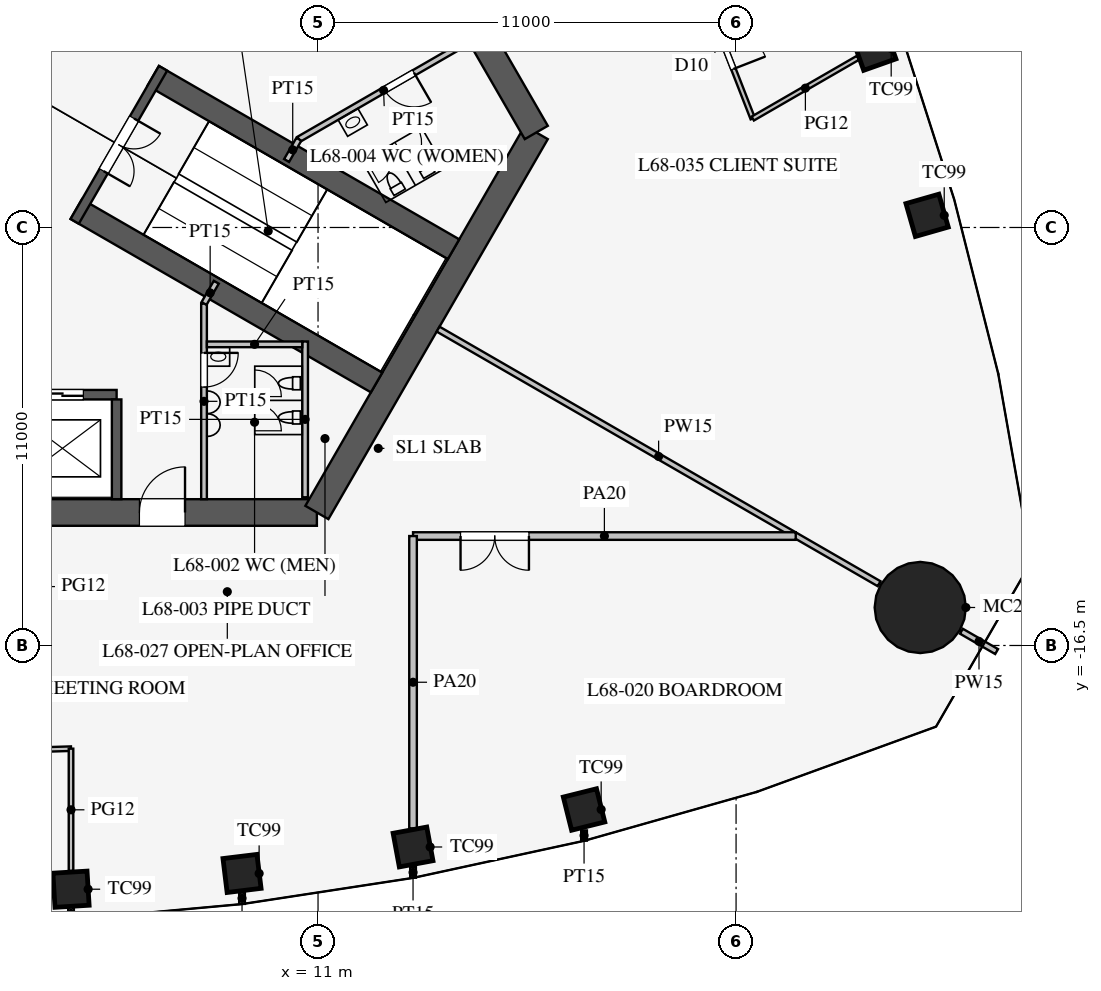
"""IFC4 building model, lengths in metres.
Left out: names, types, materials, properties, quantities, classifications, styles, units other than length and angle.
Written with IfcOpenShell. Run it as: python <this file> out.ifc"""

import sys

from ifc_helpers import new_model, si_unit, direction, frame, frame_2d, origin, origin_2d, place, context, subcontext, project, spatial, rectangle, circle, extrude, element, fill, save


model = new_model("IFC4")
c1 = context("Model", 3, precision=1e-05, world=origin(), true_north=direction((0.0, 1.0)))
c2 = subcontext(c1, "Body", "Model", "MODEL_VIEW")
j1 = project(units=[si_unit("LENGTHUNIT", "METRE"), si_unit("PLANEANGLEUNIT", "RADIAN")], contexts=[c1])
p1 = place(None, origin())
s1 = spatial("IfcSite", under=j1, at=p1, CompositionType="ELEMENT")
p2 = place(p1, origin())
s2 = spatial("IfcBuilding", under=s1, at=p2, CompositionType="ELEMENT")
p3 = place(p2, frame((0.0, 0.0, 297.3)))
s3 = spatial("IfcBuildingStorey", under=s2, at=p3, CompositionType="ELEMENT", Elevation=297.3)
for number, where, z_axis, x_axis in (
    (1, (4.5, -22.914, 0.0), (0.0, 0.0, 1.0), (0.998, 0.061, 0.0)),
    (2, (9.0, -22.499, 0.0), (0.0, 0.0, 1.0), (0.993, 0.121, 0.0)),
    (3, (13.5, -21.803, 0.0), (0.0, 0.0, 1.0), (0.983, 0.182, 0.0)),
    (4, (18.0, -20.816, 0.0), (0.0, 0.0, 1.0), (0.97, 0.242, 0.0)),
    (5, (27.027, -5.18, 0.0), (0.0, 0.0, 1.0), (-0.275, 0.961, 0.0)),
    (6, (25.632, -0.79, 0.0), (0.0, 0.0, 1.0), (-0.334, 0.942, 0.0)),
):
    element("IfcColumn", number, at=place(p3, frame(where, z_axis=z_axis, x_axis=x_axis)), inside=s3, PredefinedType="COLUMN", context=c2, shape_type="SweptSolid", body=[
        extrude(rectangle(XDim=0.9, YDim=0.9, at=origin_2d()), origin(), (0.0, 0.0, 1.0), 4.2),
    ])
p4 = place(p3, frame((26.847, -15.5, 0.0), z_axis=(0.0, 0.0, 1.0), x_axis=(1.0, 0.0, 0.0)))
e7 = element("IfcColumn", 7, at=p4, inside=s3, PredefinedType="COLUMN", context=c2, shape_type="SweptSolid", body=[
    extrude(circle(Radius=1.2, at=origin_2d()), origin(), (0.0, 0.0, 1.0), 4.2),
])
p5 = place(p3, frame((-10.97, -13.0, 0.0), z_axis=(0.0, 0.0, 1.0), x_axis=(1.0, 0.0, 0.0)))
e8 = element("IfcWall", 8, at=p5, inside=s3, PredefinedType="SHEAR", context=c2, shape_type="SweptSolid", body=[
    extrude(rectangle(XDim=21.939, YDim=0.7, at=frame_2d((10.97, 0.0))), origin(), (0.0, 0.0, 1.0), 4.2),
])
p6 = place(p5, frame((17.27, 0.0, 0.0)))
e9 = element("IfcOpeningElement", 9, at=p6, cuts=e8, PredefinedType="OPENING", context=c2, shape_type="SweptSolid", body=[
    extrude(rectangle(XDim=1.2, YDim=2.1, at=frame_2d((0.6, 1.05))), frame((0.0, 0.36, 0.0), z_axis=(0.0, -1.0, 0.0), x_axis=(1.0, 0.0, 0.0)), (0.0, 0.0, 1.0), 0.72),
])
p7 = place(p5, frame((3.47, 0.0, 0.0)))
e10 = element("IfcOpeningElement", 10, at=p7, cuts=e8, PredefinedType="OPENING", context=c2, shape_type="SweptSolid", body=[
    extrude(rectangle(XDim=1.2, YDim=2.1, at=frame_2d((0.6, 1.05))), frame((0.0, 0.36, 0.0), z_axis=(0.0, -1.0, 0.0), x_axis=(1.0, 0.0, 0.0)), (0.0, 0.0, 1.0), 0.72),
])
p8 = place(p3, frame((10.97, -13.0, 0.0), z_axis=(0.0, 0.0, 1.0), x_axis=(0.499995765644, 0.866027848477, 0.0)))
e11 = element("IfcWall", 11, at=p8, inside=s3, PredefinedType="SHEAR", context=c2, shape_type="SweptSolid", body=[
    extrude(rectangle(XDim=11.547, YDim=0.7, at=frame_2d((5.773, 0.0))), origin(), (0.0, 0.0, 1.0), 4.2),
])
p9 = place(p3, frame((16.743, -3.0, 0.0), z_axis=(0.0, 0.0, 1.0), x_axis=(-0.500002442456, 0.866023993627, 0.0)))
e12 = element("IfcWall", 12, at=p9, inside=s3, PredefinedType="SHEAR", context=c2, shape_type="SweptSolid", body=[
    extrude(rectangle(XDim=21.939, YDim=0.7, at=frame_2d((10.97, 0.0))), origin(), (0.0, 0.0, 1.0), 4.2),
])
p10 = place(p9, frame((17.27, 0.0, 0.0)))
e13 = element("IfcOpeningElement", 13, at=p10, cuts=e12, PredefinedType="OPENING", context=c2, shape_type="SweptSolid", body=[
    extrude(rectangle(XDim=1.2, YDim=2.1, at=frame_2d((0.6, 1.05))), frame((0.0, 0.36, 0.0), z_axis=(0.0, -1.0, 0.0), x_axis=(1.0, 0.0, 0.0)), (0.0, 0.0, 1.0), 0.72),
])
p11 = place(p9, frame((3.47, 0.0, 0.0)))
e14 = element("IfcOpeningElement", 14, at=p11, cuts=e12, PredefinedType="OPENING", context=c2, shape_type="SweptSolid", body=[
    extrude(rectangle(XDim=1.2, YDim=2.1, at=frame_2d((0.6, 1.05))), frame((0.0, 0.36, 0.0), z_axis=(0.0, -1.0, 0.0), x_axis=(1.0, 0.0, 0.0)), (0.0, 0.0, 1.0), 0.72),
])
p12 = place(p3, frame((-5.7, -9.9, 0.0), z_axis=(0.0, 0.0, 1.0), x_axis=(1.0, 0.0, 0.0)))
e15 = element("IfcWall", 15, at=p12, inside=s3, PredefinedType="SHEAR", context=c2, shape_type="SweptSolid", body=[
    extrude(rectangle(XDim=11.4, YDim=0.25, at=frame_2d((5.7, 0.0))), origin(), (0.0, 0.0, 1.0), 4.2),
])
p13 = place(p12, frame((0.875, 0.0, 0.0)))
e16 = element("IfcOpeningElement", 16, at=p13, cuts=e15, PredefinedType="OPENING", context=c2, shape_type="SweptSolid", body=[
    extrude(rectangle(XDim=1.1, YDim=2.2, at=frame_2d((0.55, 1.1))), frame((0.0, 0.135, 0.0), z_axis=(0.0, -1.0, 0.0), x_axis=(1.0, 0.0, 0.0)), (0.0, 0.0, 1.0), 0.27),
])
p14 = place(p12, frame((3.725, 0.0, 0.0)))
e17 = element("IfcOpeningElement", 17, at=p14, cuts=e15, PredefinedType="OPENING", context=c2, shape_type="SweptSolid", body=[
    extrude(rectangle(XDim=1.1, YDim=2.2, at=frame_2d((0.55, 1.1))), frame((0.0, 0.135, 0.0), z_axis=(0.0, -1.0, 0.0), x_axis=(1.0, 0.0, 0.0)), (0.0, 0.0, 1.0), 0.27),
])
p15 = place(p12, frame((6.575, 0.0, 0.0)))
e18 = element("IfcOpeningElement", 18, at=p15, cuts=e15, PredefinedType="OPENING", context=c2, shape_type="SweptSolid", body=[
    extrude(rectangle(XDim=1.1, YDim=2.2, at=frame_2d((0.55, 1.1))), frame((0.0, 0.135, 0.0), z_axis=(0.0, -1.0, 0.0), x_axis=(1.0, 0.0, 0.0)), (0.0, 0.0, 1.0), 0.27),
])
p16 = place(p12, frame((9.425, 0.0, 0.0)))
e19 = element("IfcOpeningElement", 19, at=p16, cuts=e15, PredefinedType="OPENING", context=c2, shape_type="SweptSolid", body=[
    extrude(rectangle(XDim=1.1, YDim=2.2, at=frame_2d((0.55, 1.1))), frame((0.0, 0.135, 0.0), z_axis=(0.0, -1.0, 0.0), x_axis=(1.0, 0.0, 0.0)), (0.0, 0.0, 1.0), 0.27),
])
p17 = place(p3, frame((5.7, -10.025, 0.0), z_axis=(0.0, 0.0, 1.0), x_axis=(0.0, -1.0, 0.0)))
e20 = element("IfcWall", 20, at=p17, inside=s3, PredefinedType="SHEAR", context=c2, shape_type="SweptSolid", body=[
    extrude(rectangle(XDim=2.625, YDim=0.25, at=frame_2d((1.312, 0.0))), origin(), (0.0, 0.0, 1.0), 4.2),
])
for number, where, z_axis, x_axis in (
    (21, (4.638, -5.016, 0.0), (0.0, 0.0, 1.0), (0.866, -0.5, 0.0)),
    (22, (6.663, -1.509, 0.0), (0.0, 0.0, 1.0), (0.866, -0.5, 0.0)),
):
    element("IfcWall", number, at=place(p3, frame(where, z_axis=z_axis, x_axis=x_axis)), inside=s3, PredefinedType="SHEAR", context=c2, shape_type="SweptSolid", body=[
        extrude(rectangle(XDim=9.125, YDim=0.6, at=frame_2d((4.562, 0.0))), origin(), (0.0, 0.0, 1.0), 4.2),
    ])
p18 = place(p3, frame((4.597, -5.339, 0.0), z_axis=(0.0, 0.0, 1.0), x_axis=(0.499984536904, 0.866034331223, 0.0)))
e23 = element("IfcWall", 23, at=p18, inside=s3, PredefinedType="SHEAR", context=c2, shape_type="SweptSolid", body=[
    extrude(rectangle(XDim=4.65, YDim=0.25, at=frame_2d((2.325, 0.0))), origin(), (0.0, 0.0, 1.0), 4.2),
])
p19 = place(p18, frame((1.525, 0.0, 0.0)))
e24 = element("IfcOpeningElement", 24, at=p19, cuts=e23, PredefinedType="OPENING", context=c2, shape_type="SweptSolid", body=[
    extrude(rectangle(XDim=1.6, YDim=2.1, at=frame_2d((0.8, 1.05))), frame((0.0, 0.135, 0.0), z_axis=(0.0, -1.0, 0.0), x_axis=(1.0, 0.0, 0.0)), (0.0, 0.0, 1.0), 0.27),
])
p20 = place(p3, frame((8.0, -7.5, 0.0), z_axis=(0.0, 0.0, 1.0), x_axis=(0.0, -1.0, 0.0)))
e25 = element("IfcWall", 25, at=p20, inside=s3, PredefinedType="PARTITIONING", context=c2, shape_type="SweptSolid", body=[
    extrude(rectangle(XDim=5.15, YDim=0.15, at=frame_2d((2.575, 0.0))), origin(), (0.0, 0.0, 1.0), 4.0),
])
p21 = place(p20, frame((1.3, 0.0, 0.0)))
e26 = element("IfcOpeningElement", 26, at=p21, cuts=e25, PredefinedType="OPENING", context=c2, shape_type="SweptSolid", body=[
    extrude(rectangle(XDim=0.9, YDim=2.1, at=frame_2d((0.45, 1.05))), frame((0.0, 0.085, 0.0), z_axis=(0.0, -1.0, 0.0), x_axis=(1.0, 0.0, 0.0)), (0.0, 0.0, 1.0), 0.17),
])
p22 = place(p3, frame((10.495, -3.178, 0.0), z_axis=(0.0, 0.0, 1.0), x_axis=(0.866037967349, 0.499978238636, 0.0)))
e27 = element("IfcWall", 27, at=p22, inside=s3, PredefinedType="PARTITIONING", context=c2, shape_type="SweptSolid", body=[
    extrude(rectangle(XDim=5.15, YDim=0.15, at=frame_2d((2.575, 0.0))), origin(), (0.0, 0.0, 1.0), 4.0),
])
p23 = place(p22, frame((2.6, 0.0, 0.0)))
e28 = element("IfcOpeningElement", 28, at=p23, cuts=e27, PredefinedType="OPENING", context=c2, shape_type="SweptSolid", body=[
    extrude(rectangle(XDim=0.9, YDim=2.1, at=frame_2d((0.45, 1.05))), frame((0.0, 0.085, 0.0), z_axis=(0.0, -1.0, 0.0), x_axis=(1.0, 0.0, 0.0)), (0.0, 0.0, 1.0), 0.17),
])
for number, where, z_axis, x_axis in (
    (29, (8.0, -7.5, 0.0), (0.0, 0.0, 1.0), (0.5, 0.866, 0.0)),
    (30, (10.495, -3.178, 0.0), (0.0, 0.0, 1.0), (-0.5, -0.866, 0.0)),
):
    element("IfcWall", number, at=place(p3, frame(where, z_axis=z_axis, x_axis=x_axis)), inside=s3, PredefinedType="PARTITIONING", context=c2, shape_type="SweptSolid", body=[
        extrude(rectangle(XDim=0.645, YDim=0.15, at=frame_2d((0.323, 0.0))), origin(), (0.0, 0.0, 1.0), 4.0),
    ])
p24 = place(p3, frame((10.66, -8.5, 0.0), z_axis=(0.0, 0.0, 1.0), x_axis=(0.0, -1.0, 0.0)))
e31 = element("IfcWall", 31, at=p24, inside=s3, PredefinedType="PARTITIONING", context=c2, shape_type="SweptSolid", body=[
    extrude(rectangle(XDim=4.1, YDim=0.15, at=frame_2d((2.05, 0.0))), origin(), (0.0, 0.0, 1.0), 4.0),
])
p25 = place(p3, frame((8.075, -8.575, 0.0), z_axis=(0.0, 0.0, 1.0), x_axis=(1.0, 0.0, 0.0)))
e32 = element("IfcWall", 32, at=p25, inside=s3, PredefinedType="PARTITIONING", context=c2, shape_type="SweptSolid", body=[
    extrude(rectangle(XDim=2.51, YDim=0.15, at=frame_2d((1.255, 0.0))), origin(), (0.0, 0.0, 1.0), 4.0),
])
p26 = place(p3, frame((14.159, -8.175, 0.0), z_axis=(0.0, 0.0, 1.0), x_axis=(0.866026905467, -0.499997399001, 0.0)))
e33 = element("IfcWall", 33, at=p26, inside=s3, PredefinedType="PARTITIONING", context=c2, shape_type="SweptSolid", body=[
    extrude(rectangle(XDim=13.4, YDim=0.15, at=frame_2d((6.7, 0.0))), origin(), (0.0, 0.0, 1.0), 2.5),
])
p27 = place(p3, frame((27.929, -16.125, 0.0), z_axis=(0.0, 0.0, 1.0), x_axis=(0.866086810508, -0.499893625349, 0.0)))
e34 = element("IfcWall", 34, at=p27, inside=s3, PredefinedType="PARTITIONING", context=c2, shape_type="SweptSolid", body=[
    extrude(rectangle(XDim=1.07, YDim=0.15, at=frame_2d((0.535, 0.0))), origin(), (0.0, 0.0, 1.0), 2.5),
])
p28 = place(p3, frame((13.5, -13.62, 0.0), z_axis=(0.0, 0.0, 1.0), x_axis=(1.0, 0.0, 0.0)))
e35 = element("IfcWall", 35, at=p28, inside=s3, PredefinedType="PARTITIONING", context=c2, shape_type="SweptSolid", body=[
    extrude(rectangle(XDim=10.07, YDim=0.2, at=frame_2d((5.035, 0.0))), origin(), (0.0, 0.0, 1.0), 2.9),
])
p29 = place(p28, frame((1.25, 0.0, 0.15)))
e36 = element("IfcOpeningElement", 36, at=p29, cuts=e35, PredefinedType="OPENING", context=c2, shape_type="SweptSolid", body=[
    extrude(rectangle(XDim=1.8, YDim=2.1, at=frame_2d((0.9, 1.05))), frame((0.0, 0.11, 0.0), z_axis=(0.0, -1.0, 0.0), x_axis=(1.0, 0.0, 0.0)), (0.0, 0.0, 1.0), 0.22),
])
p30 = place(p3, frame((13.5, -22.331, 0.0), z_axis=(0.0, 0.0, 1.0), x_axis=(0.0, -1.0, 0.0)))
e37 = element("IfcWall", 37, at=p30, inside=s3, PredefinedType="PARTITIONING", context=c2, shape_type="SweptSolid", body=[
    extrude(rectangle(XDim=0.28, YDim=0.15, at=frame_2d((0.14, 0.0))), origin(), (0.0, 0.0, 1.0), 2.9),
])
p31 = place(p3, frame((18.0, -21.366, 0.0), z_axis=(0.0, 0.0, 1.0), x_axis=(0.0, -1.0, 0.0)))
e38 = element("IfcWall", 38, at=p31, inside=s3, PredefinedType="PARTITIONING", context=c2, shape_type="SweptSolid", body=[
    extrude(rectangle(XDim=0.27, YDim=0.15, at=frame_2d((0.135, 0.0))), origin(), (0.0, 0.0, 1.0), 2.9),
])
p32 = place(p3, frame((4.5, -23.394, 0.0), z_axis=(0.0, 0.0, 1.0), x_axis=(0.0, -1.0, 0.0)))
e39 = element("IfcWall", 39, at=p32, inside=s3, PredefinedType="PARTITIONING", context=c2, shape_type="SweptSolid", body=[
    extrude(rectangle(XDim=0.316, YDim=0.15, at=frame_2d((0.158, 0.0))), origin(), (0.0, 0.0, 1.0), 2.9),
])
p33 = place(p3, frame((9.0, -23.004, 0.0), z_axis=(0.0, 0.0, 1.0), x_axis=(0.0, -1.0, 0.0)))
e40 = element("IfcWall", 40, at=p33, inside=s3, PredefinedType="PARTITIONING", context=c2, shape_type="SweptSolid", body=[
    extrude(rectangle(XDim=0.296, YDim=0.15, at=frame_2d((0.148, 0.0))), origin(), (0.0, 0.0, 1.0), 2.9),
])
p34 = place(p3, frame((0.0, -19.352, 0.0), z_axis=(0.0, 0.0, 1.0), x_axis=(0.999542074227, 0.030259574513, 0.0)))
e41 = element("IfcWall", 41, at=p34, inside=s3, PredefinedType="PARTITIONING", context=c2, shape_type="SweptSolid", body=[
    extrude(rectangle(XDim=4.502, YDim=0.12, at=frame_2d((2.251, 0.0))), origin(), (0.0, 0.0, 1.0), 2.9),
])
p35 = place(p34, frame((1.75, 0.0, 0.15)))
e42 = element("IfcOpeningElement", 42, at=p35, cuts=e41, PredefinedType="OPENING", context=c2, shape_type="SweptSolid", body=[
    extrude(rectangle(XDim=1.0, YDim=2.1, at=frame_2d((0.5, 1.05))), frame((0.0, 0.07, 0.0), z_axis=(0.0, -1.0, 0.0), x_axis=(1.0, 0.0, 0.0)), (0.0, 0.0, 1.0), 0.14),
])
p36 = place(p3, frame((13.5, -13.62, 0.0), z_axis=(0.0, 0.0, 1.0), x_axis=(0.0, -1.0, 0.0)))
e43 = element("IfcWall", 43, at=p36, inside=s3, PredefinedType="PARTITIONING", context=c2, shape_type="SweptSolid", body=[
    extrude(rectangle(XDim=7.695, YDim=0.2, at=frame_2d((3.847, 0.0))), origin(), (0.0, 0.0, 1.0), 2.9),
])
p37 = place(p3, frame((4.5, -19.215, 0.0), z_axis=(0.0, 0.0, 1.0), x_axis=(0.0, -1.0, 0.0)))
e44 = element("IfcWall", 44, at=p37, inside=s3, PredefinedType="PARTITIONING", context=c2, shape_type="SweptSolid", body=[
    extrude(rectangle(XDim=3.218, YDim=0.12, at=frame_2d((1.609, 0.0))), origin(), (0.0, 0.0, 1.0), 2.9),
])
p38 = place(p3, frame((22.439, -2.633, 0.0), z_axis=(0.0, 0.0, 1.0), x_axis=(-0.363212149153, 0.931706463811, 0.0)))
e45 = element("IfcWall", 45, at=p38, inside=s3, PredefinedType="PARTITIONING", context=c2, shape_type="SweptSolid", body=[
    extrude(rectangle(XDim=4.553, YDim=0.12, at=frame_2d((2.276, 0.0))), origin(), (0.0, 0.0, 1.0), 2.9),
])
p39 = place(p38, frame((1.4, 0.0, 0.15)))
e46 = element("IfcOpeningElement", 46, at=p39, cuts=e45, PredefinedType="OPENING", context=c2, shape_type="SweptSolid", body=[
    extrude(rectangle(XDim=1.8, YDim=2.1, at=frame_2d((0.9, 1.05))), frame((0.0, 0.07, 0.0), z_axis=(0.0, -1.0, 0.0), x_axis=(1.0, 0.0, 0.0)), (0.0, 0.0, 1.0), 0.14),
])
p40 = place(p3, frame((22.439, -2.633, 0.0), z_axis=(0.0, 0.0, 1.0), x_axis=(0.866012717091, 0.500021973353, 0.0)))
e47 = element("IfcWall", 47, at=p40, inside=s3, PredefinedType="PARTITIONING", context=c2, shape_type="SweptSolid", body=[
    extrude(rectangle(XDim=3.198, YDim=0.12, at=frame_2d((1.599, 0.0))), origin(), (0.0, 0.0, 1.0), 2.9),
])
p41 = place(p21, origin())
e48 = element("IfcDoor", 48, at=p41, inside=s3, OperationType="SINGLE_SWING_LEFT", PredefinedType="DOOR", context=c2, shape_type="SweptSolid", body=[
    extrude(rectangle(XDim=0.9, YDim=2.1, at=frame_2d((0.45, 1.05))), frame((0.0, 0.025, 0.0), z_axis=(0.0, -1.0, 0.0), x_axis=(1.0, 0.0, 0.0)), (0.0, 0.0, 1.0), 0.05),
])
fill(e26, e48)
p42 = place(p23, frame((0.9, 0.0, 0.0), z_axis=(0.0, 0.0, 1.0), x_axis=(-1.0, 0.0, 0.0)))
e49 = element("IfcDoor", 49, at=p42, inside=s3, OperationType="SINGLE_SWING_LEFT", PredefinedType="DOOR", context=c2, shape_type="SweptSolid", body=[
    extrude(rectangle(XDim=0.9, YDim=2.1, at=frame_2d((0.45, 1.05))), frame((0.0, 0.025, 0.0), z_axis=(0.0, -1.0, 0.0), x_axis=(1.0, 0.0, 0.0)), (0.0, 0.0, 1.0), 0.05),
])
fill(e28, e49)
p43 = place(p19, frame((1.6, 0.0, 0.0), z_axis=(0.0, 0.0, 1.0), x_axis=(-1.0, 0.0, 0.0)))
e50 = element("IfcDoor", 50, at=p43, inside=s3, OperationType="DOUBLE_DOOR_SINGLE_SWING", PredefinedType="DOOR", context=c2, shape_type="SweptSolid", body=[
    extrude(rectangle(XDim=1.6, YDim=2.1, at=frame_2d((0.8, 1.05))), frame((0.0, 0.025, 0.0), z_axis=(0.0, -1.0, 0.0), x_axis=(1.0, 0.0, 0.0)), (0.0, 0.0, 1.0), 0.05),
])
fill(e24, e50)
p44 = place(p6, origin())
e51 = element("IfcDoor", 51, at=p44, inside=s3, OperationType="SINGLE_SWING_RIGHT", PredefinedType="DOOR", context=c2, shape_type="SweptSolid", body=[
    extrude(rectangle(XDim=1.2, YDim=2.1, at=frame_2d((0.6, 1.05))), frame((0.0, 0.025, 0.0), z_axis=(0.0, -1.0, 0.0), x_axis=(1.0, 0.0, 0.0)), (0.0, 0.0, 1.0), 0.05),
])
fill(e9, e51)
p45 = place(p29, frame((1.8, 0.0, 0.0), z_axis=(0.0, 0.0, 1.0), x_axis=(-1.0, 0.0, 0.0)))
e52 = element("IfcDoor", 52, at=p45, inside=s3, OperationType="DOUBLE_DOOR_SINGLE_SWING", PredefinedType="DOOR", context=c2, shape_type="SweptSolid", body=[
    extrude(rectangle(XDim=1.8, YDim=2.1, at=frame_2d((0.9, 1.05))), frame((0.0, 0.025, 0.0), z_axis=(0.0, -1.0, 0.0), x_axis=(1.0, 0.0, 0.0)), (0.0, 0.0, 1.0), 0.05),
])
fill(e36, e52)
p46 = place(p39, frame((1.8, 0.0, 0.0), z_axis=(0.0, 0.0, 1.0), x_axis=(-1.0, 0.0, 0.0)))
e53 = element("IfcDoor", 53, at=p46, inside=s3, OperationType="DOUBLE_DOOR_SINGLE_SWING", PredefinedType="DOOR", context=c2, shape_type="SweptSolid", body=[
    extrude(rectangle(XDim=1.8, YDim=2.1, at=frame_2d((0.9, 1.05))), frame((0.0, 0.025, 0.0), z_axis=(0.0, -1.0, 0.0), x_axis=(1.0, 0.0, 0.0)), (0.0, 0.0, 1.0), 0.05),
])
fill(e46, e53)
p47 = place(p16, origin())
e54 = element("IfcDoor", 54, at=p47, inside=s3, OperationType="DOUBLE_DOOR_SLIDING", PredefinedType="DOOR", context=c2, shape_type="SweptSolid", body=[
    extrude(rectangle(XDim=1.1, YDim=2.2, at=frame_2d((0.55, 1.1))), frame((0.0, 0.025, 0.0), z_axis=(0.0, -1.0, 0.0), x_axis=(1.0, 0.0, 0.0)), (0.0, 0.0, 1.0), 0.05),
])
fill(e19, e54)
save(model, sys.argv[1])
